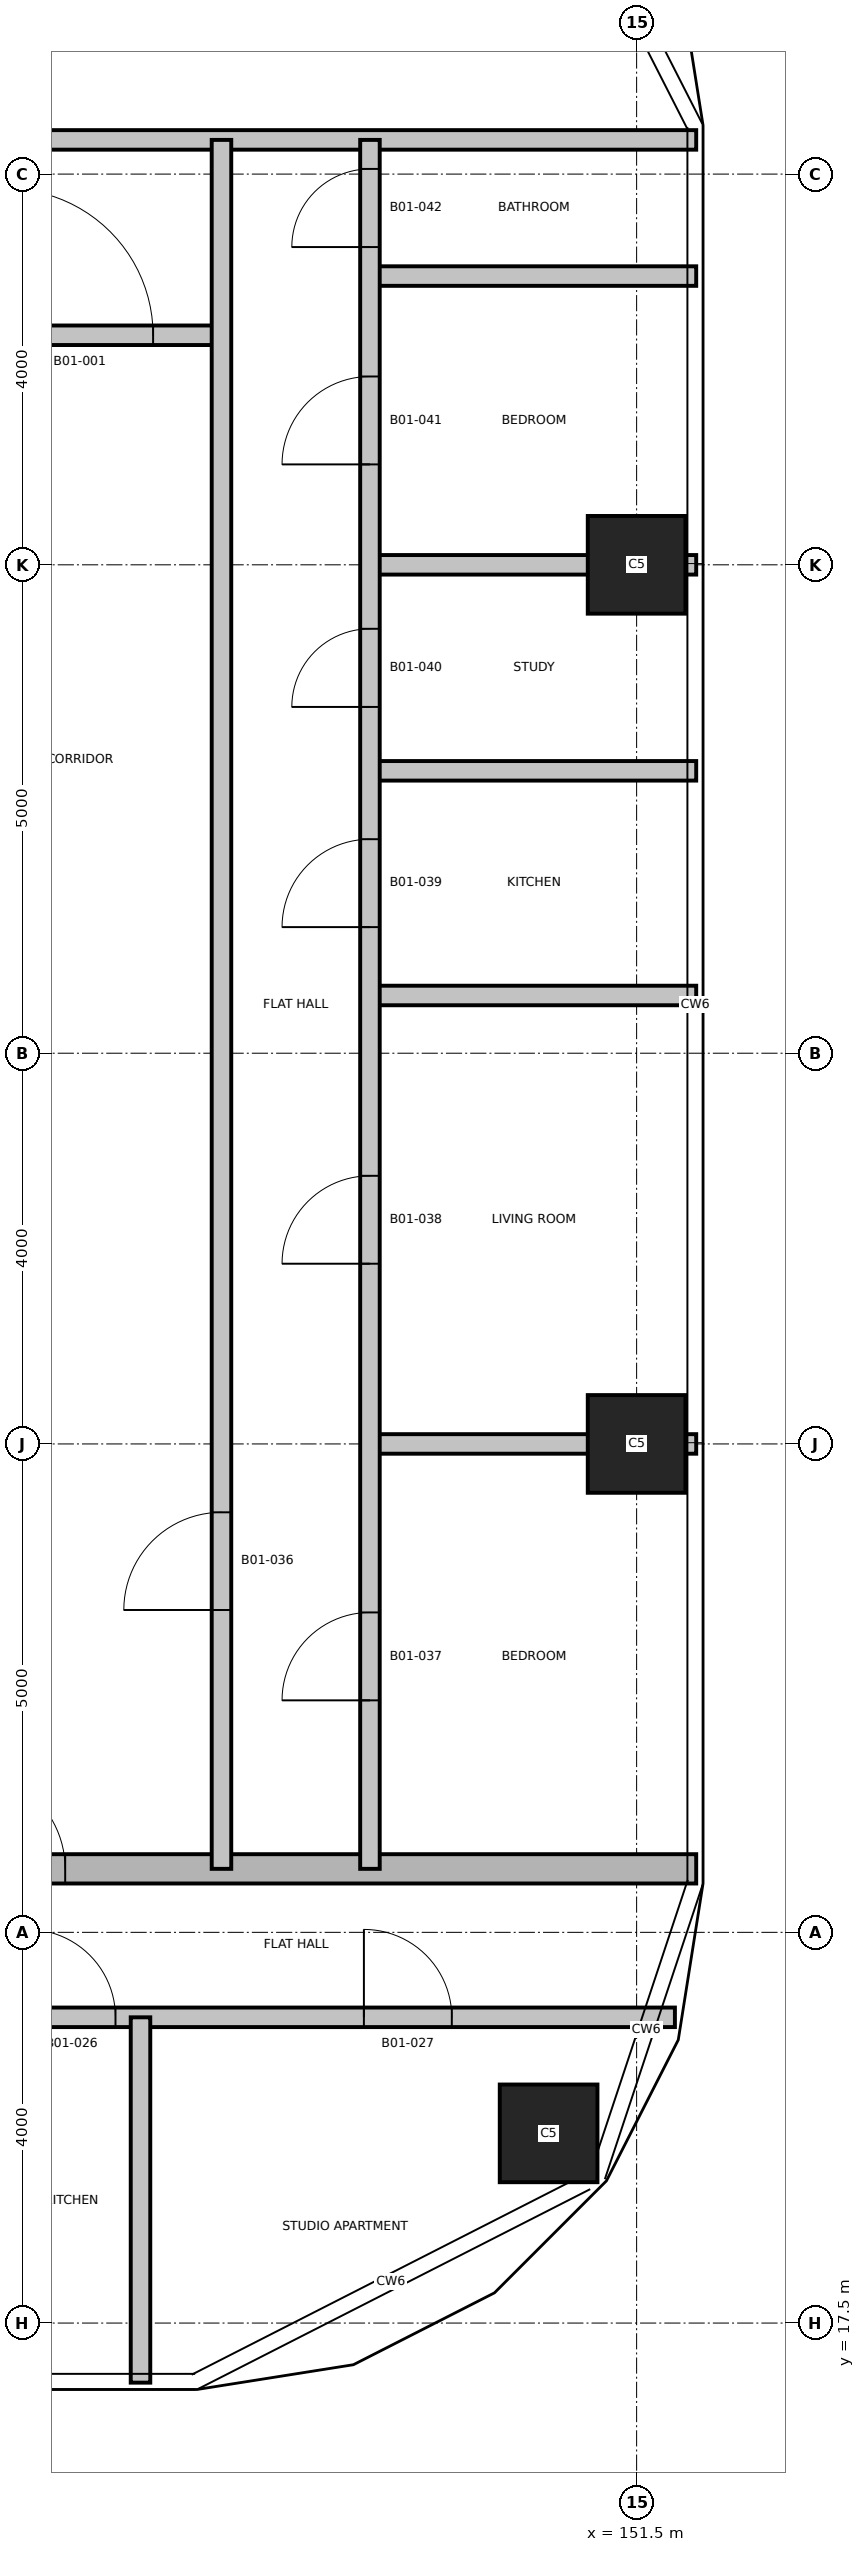
"""IFC4 building model, lengths in metres.
Left out: names, types, materials, properties, quantities, classifications, styles, units other than length and angle.
Written with IfcOpenShell. Run it as: python <this file> out.ifc"""

import sys

from ifc_helpers import new_model, si_unit, direction, frame, frame_2d, origin, origin_2d, place, context, subcontext, project, spatial, rectangle, extrude, element, fill, save


model = new_model("IFC4")
c1 = context("Model", 3, precision=1e-05, world=origin(), true_north=direction((0.0, 1.0)))
c2 = subcontext(c1, "Body", "Model", "MODEL_VIEW")
j1 = project(units=[si_unit("LENGTHUNIT", "METRE"), si_unit("PLANEANGLEUNIT", "RADIAN")], contexts=[c1])
p1 = place(None, origin())
s1 = spatial("IfcSite", under=j1, at=p1, CompositionType="ELEMENT")
p2 = place(p1, origin())
s2 = spatial("IfcBuilding", under=s1, at=p2, CompositionType="ELEMENT")
p3 = place(p2, frame((0.0, 0.0, 37.2)))
s3 = spatial("IfcBuildingStorey", under=s2, at=p3, CompositionType="ELEMENT", Elevation=37.2)
for number, where, z_axis, x_axis in (
    (1, (150.599, 19.442, 0.0), (0.0, 0.0, 1.0), (1.0, 0.0, 0.0)),
    (2, (151.5, 26.5, 0.0), (0.0, 0.0, 1.0), (1.0, 0.0, 0.0)),
    (3, (151.5, 35.5, 0.0), (0.0, 0.0, 1.0), (1.0, 0.0, 0.0)),
):
    element("IfcColumn", number, at=place(p3, frame(where, z_axis=z_axis, x_axis=x_axis)), inside=s3, PredefinedType="COLUMN", context=c2, shape_type="SweptSolid", body=[
        extrude(rectangle(XDim=1.0, YDim=1.0, at=origin_2d()), origin(), (0.0, 0.0, 1.0), 3.7),
    ])
p4 = place(p3, frame((144.0, 20.63, 0.0), z_axis=(0.0, 0.0, 1.0), x_axis=(1.0, 0.0, 0.0)))
e4 = element("IfcWall", 4, at=p4, inside=s3, PredefinedType="PARTITIONING", context=c2, shape_type="SweptSolid", body=[
    extrude(rectangle(XDim=7.892, YDim=0.2, at=frame_2d((3.946, 0.0))), origin(), (0.0, 0.0, 1.0), 3.4),
])
p5 = place(p4, frame((0.17, 0.0, 0.0)))
e5 = element("IfcOpeningElement", 5, at=p5, cuts=e4, PredefinedType="OPENING", context=c2, shape_type="SweptSolid", body=[
    extrude(rectangle(XDim=0.734, YDim=2.1, at=frame_2d((0.367, 1.05))), frame((0.0, 0.11, 0.0), z_axis=(0.0, -1.0, 0.0), x_axis=(1.0, 0.0, 0.0)), (0.0, 0.0, 1.0), 0.22),
])
p6 = place(p4, frame((1.265, 0.0, 0.0)))
e6 = element("IfcOpeningElement", 6, at=p6, cuts=e4, PredefinedType="OPENING", context=c2, shape_type="SweptSolid", body=[
    extrude(rectangle(XDim=0.9, YDim=2.1, at=frame_2d((0.45, 1.05))), frame((0.0, 0.11, 0.0), z_axis=(0.0, -1.0, 0.0), x_axis=(1.0, 0.0, 0.0)), (0.0, 0.0, 1.0), 0.22),
])
p7 = place(p4, frame((4.708, 0.0, 0.0)))
e7 = element("IfcOpeningElement", 7, at=p7, cuts=e4, PredefinedType="OPENING", context=c2, shape_type="SweptSolid", body=[
    extrude(rectangle(XDim=0.9, YDim=2.1, at=frame_2d((0.45, 1.05))), frame((0.0, 0.11, 0.0), z_axis=(0.0, -1.0, 0.0), x_axis=(1.0, 0.0, 0.0)), (0.0, 0.0, 1.0), 0.22),
])
p8 = place(p3, frame((120.89, 22.15, 0.0), z_axis=(0.0, 0.0, 1.0), x_axis=(1.0, 0.0, 0.0)))
e8 = element("IfcWall", 8, at=p8, inside=s3, PredefinedType="SHEAR", context=c2, shape_type="SweptSolid", body=[
    extrude(rectangle(XDim=31.22, YDim=0.3, at=frame_2d((15.61, 0.0))), origin(), (0.0, 0.0, 1.0), 3.4),
])
p9 = place(p8, frame((21.86, 0.0, 0.0)))
e9 = element("IfcOpeningElement", 9, at=p9, cuts=e8, PredefinedType="OPENING", context=c2, shape_type="SweptSolid", body=[
    extrude(rectangle(XDim=1.0, YDim=2.1, at=frame_2d((0.5, 1.05))), frame((0.0, 0.16, 0.0), z_axis=(0.0, -1.0, 0.0), x_axis=(1.0, 0.0, 0.0)), (0.0, 0.0, 1.0), 0.32),
])
p10 = place(p8, frame((6.46, 0.0, 0.0)))
e10 = element("IfcOpeningElement", 10, at=p10, cuts=e8, PredefinedType="OPENING", context=c2, shape_type="SweptSolid", body=[
    extrude(rectangle(XDim=1.0, YDim=2.1, at=frame_2d((0.5, 1.05))), frame((0.0, 0.16, 0.0), z_axis=(0.0, -1.0, 0.0), x_axis=(1.0, 0.0, 0.0)), (0.0, 0.0, 1.0), 0.32),
])
p11 = place(p8, frame((11.36, 0.0, 0.0)))
e11 = element("IfcOpeningElement", 11, at=p11, cuts=e8, PredefinedType="OPENING", context=c2, shape_type="SweptSolid", body=[
    extrude(rectangle(XDim=1.0, YDim=2.1, at=frame_2d((0.5, 1.05))), frame((0.0, 0.16, 0.0), z_axis=(0.0, -1.0, 0.0), x_axis=(1.0, 0.0, 0.0)), (0.0, 0.0, 1.0), 0.32),
])
p12 = place(p8, frame((23.76, 0.0, 0.0)))
e12 = element("IfcOpeningElement", 12, at=p12, cuts=e8, PredefinedType="OPENING", context=c2, shape_type="SweptSolid", body=[
    extrude(rectangle(XDim=1.0, YDim=2.1, at=frame_2d((0.5, 1.05))), frame((0.0, 0.16, 0.0), z_axis=(0.0, -1.0, 0.0), x_axis=(1.0, 0.0, 0.0)), (0.0, 0.0, 1.0), 0.32),
])
p13 = place(p8, frame((15.86, 0.0, 0.0)))
e13 = element("IfcOpeningElement", 13, at=p13, cuts=e8, PredefinedType="OPENING", context=c2, shape_type="SweptSolid", body=[
    extrude(rectangle(XDim=0.9, YDim=2.1, at=frame_2d((0.45, 1.05))), frame((0.0, 0.16, 0.0), z_axis=(0.0, -1.0, 0.0), x_axis=(1.0, 0.0, 0.0)), (0.0, 0.0, 1.0), 0.32),
])
for number, where, z_axis, x_axis in (
    (14, (148.77, 26.5, 0.0), (0.0, 0.0, 1.0), (1.0, 0.0, 0.0)),
    (15, (148.77, 31.091, 0.0), (0.0, 0.0, 1.0), (1.0, 0.0, 0.0)),
    (16, (148.77, 33.391, 0.0), (0.0, 0.0, 1.0), (1.0, 0.0, 0.0)),
    (17, (148.77, 35.5, 0.0), (0.0, 0.0, 1.0), (1.0, 0.0, 0.0)),
):
    element("IfcWall", number, at=place(p3, frame(where, z_axis=z_axis, x_axis=x_axis)), inside=s3, PredefinedType="PARTITIONING", context=c2, shape_type="SweptSolid", body=[
        extrude(rectangle(XDim=3.34, YDim=0.2, at=frame_2d((1.67, 0.0))), origin(), (0.0, 0.0, 1.0), 3.4),
    ])
p14 = place(p3, frame((144.02, 37.85, 0.0), z_axis=(0.0, 0.0, 1.0), x_axis=(1.0, 0.0, 0.0)))
e18 = element("IfcWall", 18, at=p14, inside=s3, PredefinedType="PARTITIONING", context=c2, shape_type="SweptSolid", body=[
    extrude(rectangle(XDim=3.23, YDim=0.2, at=frame_2d((1.615, 0.0))), origin(), (0.0, 0.0, 1.0), 3.4),
])
p15 = place(p14, frame((1.03, 0.0, 0.0)))
e19 = element("IfcOpeningElement", 19, at=p15, cuts=e18, PredefinedType="OPENING", context=c2, shape_type="SweptSolid", body=[
    extrude(rectangle(XDim=1.5, YDim=2.1, at=frame_2d((0.75, 1.05))), frame((0.0, 0.11, 0.0), z_axis=(0.0, -1.0, 0.0), x_axis=(1.0, 0.0, 0.0)), (0.0, 0.0, 1.0), 0.22),
])
p16 = place(p3, frame((148.77, 38.456, 0.0), z_axis=(0.0, 0.0, 1.0), x_axis=(1.0, 0.0, 0.0)))
e20 = element("IfcWall", 20, at=p16, inside=s3, PredefinedType="PARTITIONING", context=c2, shape_type="SweptSolid", body=[
    extrude(rectangle(XDim=3.34, YDim=0.2, at=frame_2d((1.67, 0.0))), origin(), (0.0, 0.0, 1.0), 3.4),
])
p17 = place(p3, frame((120.89, 39.85, 0.0), z_axis=(0.0, 0.0, 1.0), x_axis=(1.0, 0.0, 0.0)))
e21 = element("IfcWall", 21, at=p17, inside=s3, PredefinedType="PARTITIONING", context=c2, shape_type="SweptSolid", body=[
    extrude(rectangle(XDim=31.22, YDim=0.2, at=frame_2d((15.61, 0.0))), origin(), (0.0, 0.0, 1.0), 3.4),
])
p18 = place(p17, frame((10.21, 0.0, 0.0)))
e22 = element("IfcOpeningElement", 22, at=p18, cuts=e21, PredefinedType="OPENING", context=c2, shape_type="SweptSolid", body=[
    extrude(rectangle(XDim=1.0, YDim=2.1, at=frame_2d((0.5, 1.05))), frame((0.0, 0.11, 0.0), z_axis=(0.0, -1.0, 0.0), x_axis=(1.0, 0.0, 0.0)), (0.0, 0.0, 1.0), 0.22),
])
p19 = place(p17, frame((20.01, 0.0, 0.0)))
e23 = element("IfcOpeningElement", 23, at=p19, cuts=e21, PredefinedType="OPENING", context=c2, shape_type="SweptSolid", body=[
    extrude(rectangle(XDim=1.0, YDim=2.1, at=frame_2d((0.5, 1.05))), frame((0.0, 0.11, 0.0), z_axis=(0.0, -1.0, 0.0), x_axis=(1.0, 0.0, 0.0)), (0.0, 0.0, 1.0), 0.22),
])
p20 = place(p3, frame((146.421, 16.89, 0.0), z_axis=(0.0, 0.0, 1.0), x_axis=(0.0, 1.0, 0.0)))
e24 = element("IfcWall", 24, at=p20, inside=s3, PredefinedType="PARTITIONING", context=c2, shape_type="SweptSolid", body=[
    extrude(rectangle(XDim=3.74, YDim=0.2, at=frame_2d((1.87, 0.0))), origin(), (0.0, 0.0, 1.0), 3.4),
])
p21 = place(p3, frame((147.25, 22.15, 0.0), z_axis=(0.0, 0.0, 1.0), x_axis=(0.0, 1.0, 0.0)))
e25 = element("IfcWall", 25, at=p21, inside=s3, PredefinedType="PARTITIONING", context=c2, shape_type="SweptSolid", body=[
    extrude(rectangle(XDim=17.7, YDim=0.2, at=frame_2d((8.85, 0.0))), origin(), (0.0, 0.0, 1.0), 3.4),
])
p22 = place(p21, frame((2.65, 0.0, 0.0)))
e26 = element("IfcOpeningElement", 26, at=p22, cuts=e25, PredefinedType="OPENING", context=c2, shape_type="SweptSolid", body=[
    extrude(rectangle(XDim=1.0, YDim=2.1, at=frame_2d((0.5, 1.05))), frame((0.0, 0.11, 0.0), z_axis=(0.0, -1.0, 0.0), x_axis=(1.0, 0.0, 0.0)), (0.0, 0.0, 1.0), 0.22),
])
p23 = place(p3, frame((148.77, 22.15, 0.0), z_axis=(0.0, 0.0, 1.0), x_axis=(0.0, 1.0, 0.0)))
e27 = element("IfcWall", 27, at=p23, inside=s3, PredefinedType="PARTITIONING", context=c2, shape_type="SweptSolid", body=[
    extrude(rectangle(XDim=17.7, YDim=0.2, at=frame_2d((8.85, 0.0))), origin(), (0.0, 0.0, 1.0), 3.4),
])
p24 = place(p23, frame((1.725, 0.0, 0.0)))
e28 = element("IfcOpeningElement", 28, at=p24, cuts=e27, PredefinedType="OPENING", context=c2, shape_type="SweptSolid", body=[
    extrude(rectangle(XDim=0.9, YDim=2.1, at=frame_2d((0.45, 1.05))), frame((0.0, 0.11, 0.0), z_axis=(0.0, -1.0, 0.0), x_axis=(1.0, 0.0, 0.0)), (0.0, 0.0, 1.0), 0.22),
])
p25 = place(p23, frame((6.195, 0.0, 0.0)))
e29 = element("IfcOpeningElement", 29, at=p25, cuts=e27, PredefinedType="OPENING", context=c2, shape_type="SweptSolid", body=[
    extrude(rectangle(XDim=0.9, YDim=2.1, at=frame_2d((0.45, 1.05))), frame((0.0, 0.11, 0.0), z_axis=(0.0, -1.0, 0.0), x_axis=(1.0, 0.0, 0.0)), (0.0, 0.0, 1.0), 0.22),
])
p26 = place(p23, frame((9.641, 0.0, 0.0)))
e30 = element("IfcOpeningElement", 30, at=p26, cuts=e27, PredefinedType="OPENING", context=c2, shape_type="SweptSolid", body=[
    extrude(rectangle(XDim=0.9, YDim=2.1, at=frame_2d((0.45, 1.05))), frame((0.0, 0.11, 0.0), z_axis=(0.0, -1.0, 0.0), x_axis=(1.0, 0.0, 0.0)), (0.0, 0.0, 1.0), 0.22),
])
p27 = place(p23, frame((11.895, 0.0, 0.0)))
e31 = element("IfcOpeningElement", 31, at=p27, cuts=e27, PredefinedType="OPENING", context=c2, shape_type="SweptSolid", body=[
    extrude(rectangle(XDim=0.8, YDim=2.1, at=frame_2d((0.4, 1.05))), frame((0.0, 0.11, 0.0), z_axis=(0.0, -1.0, 0.0), x_axis=(1.0, 0.0, 0.0)), (0.0, 0.0, 1.0), 0.22),
])
p28 = place(p23, frame((14.378, 0.0, 0.0)))
e32 = element("IfcOpeningElement", 32, at=p28, cuts=e27, PredefinedType="OPENING", context=c2, shape_type="SweptSolid", body=[
    extrude(rectangle(XDim=0.9, YDim=2.1, at=frame_2d((0.45, 1.05))), frame((0.0, 0.11, 0.0), z_axis=(0.0, -1.0, 0.0), x_axis=(1.0, 0.0, 0.0)), (0.0, 0.0, 1.0), 0.22),
])
p29 = place(p23, frame((16.603, 0.0, 0.0)))
e33 = element("IfcOpeningElement", 33, at=p29, cuts=e27, PredefinedType="OPENING", context=c2, shape_type="SweptSolid", body=[
    extrude(rectangle(XDim=0.8, YDim=2.1, at=frame_2d((0.4, 1.05))), frame((0.0, 0.11, 0.0), z_axis=(0.0, -1.0, 0.0), x_axis=(1.0, 0.0, 0.0)), (0.0, 0.0, 1.0), 0.22),
])
p30 = place(p15, origin())
e34 = element("IfcDoor", 34, at=p30, inside=s3, OperationType="SINGLE_SWING_LEFT", PredefinedType="DOOR", context=c2, shape_type="SweptSolid", body=[
    extrude(rectangle(XDim=1.5, YDim=2.1, at=frame_2d((0.75, 1.05))), frame((0.0, 0.025, 0.0), z_axis=(0.0, -1.0, 0.0), x_axis=(1.0, 0.0, 0.0)), (0.0, 0.0, 1.0), 0.05),
])
fill(e19, e34)
p31 = place(p12, origin())
e35 = element("IfcDoor", 35, at=p31, inside=s3, OperationType="SINGLE_SWING_RIGHT", PredefinedType="DOOR", context=c2, shape_type="SweptSolid", body=[
    extrude(rectangle(XDim=1.0, YDim=2.1, at=frame_2d((0.5, 1.05))), frame((0.0, 0.025, 0.0), z_axis=(0.0, -1.0, 0.0), x_axis=(1.0, 0.0, 0.0)), (0.0, 0.0, 1.0), 0.05),
])
fill(e12, e35)
p32 = place(p6, origin())
e36 = element("IfcDoor", 36, at=p32, inside=s3, OperationType="SINGLE_SWING_RIGHT", PredefinedType="DOOR", context=c2, shape_type="SweptSolid", body=[
    extrude(rectangle(XDim=0.9, YDim=2.1, at=frame_2d((0.45, 1.05))), frame((0.0, 0.025, 0.0), z_axis=(0.0, -1.0, 0.0), x_axis=(1.0, 0.0, 0.0)), (0.0, 0.0, 1.0), 0.05),
])
fill(e6, e36)
p33 = place(p7, origin())
e37 = element("IfcDoor", 37, at=p33, inside=s3, OperationType="SINGLE_SWING_LEFT", PredefinedType="DOOR", context=c2, shape_type="SweptSolid", body=[
    extrude(rectangle(XDim=0.9, YDim=2.1, at=frame_2d((0.45, 1.05))), frame((0.0, 0.025, 0.0), z_axis=(0.0, -1.0, 0.0), x_axis=(1.0, 0.0, 0.0)), (0.0, 0.0, 1.0), 0.05),
])
fill(e7, e37)
p34 = place(p22, origin())
e38 = element("IfcDoor", 38, at=p34, inside=s3, OperationType="SINGLE_SWING_RIGHT", PredefinedType="DOOR", context=c2, shape_type="SweptSolid", body=[
    extrude(rectangle(XDim=1.0, YDim=2.1, at=frame_2d((0.5, 1.05))), frame((0.0, 0.025, 0.0), z_axis=(0.0, -1.0, 0.0), x_axis=(1.0, 0.0, 0.0)), (0.0, 0.0, 1.0), 0.05),
])
fill(e26, e38)
p35 = place(p24, origin())
e39 = element("IfcDoor", 39, at=p35, inside=s3, OperationType="SINGLE_SWING_LEFT", PredefinedType="DOOR", context=c2, shape_type="SweptSolid", body=[
    extrude(rectangle(XDim=0.9, YDim=2.1, at=frame_2d((0.45, 1.05))), frame((0.0, 0.025, 0.0), z_axis=(0.0, -1.0, 0.0), x_axis=(1.0, 0.0, 0.0)), (0.0, 0.0, 1.0), 0.05),
])
fill(e28, e39)
p36 = place(p25, origin())
e40 = element("IfcDoor", 40, at=p36, inside=s3, OperationType="SINGLE_SWING_RIGHT", PredefinedType="DOOR", context=c2, shape_type="SweptSolid", body=[
    extrude(rectangle(XDim=0.9, YDim=2.1, at=frame_2d((0.45, 1.05))), frame((0.0, 0.025, 0.0), z_axis=(0.0, -1.0, 0.0), x_axis=(1.0, 0.0, 0.0)), (0.0, 0.0, 1.0), 0.05),
])
fill(e29, e40)
p37 = place(p26, origin())
e41 = element("IfcDoor", 41, at=p37, inside=s3, OperationType="SINGLE_SWING_LEFT", PredefinedType="DOOR", context=c2, shape_type="SweptSolid", body=[
    extrude(rectangle(XDim=0.9, YDim=2.1, at=frame_2d((0.45, 1.05))), frame((0.0, 0.025, 0.0), z_axis=(0.0, -1.0, 0.0), x_axis=(1.0, 0.0, 0.0)), (0.0, 0.0, 1.0), 0.05),
])
fill(e30, e41)
p38 = place(p27, origin())
e42 = element("IfcDoor", 42, at=p38, inside=s3, OperationType="SINGLE_SWING_RIGHT", PredefinedType="DOOR", context=c2, shape_type="SweptSolid", body=[
    extrude(rectangle(XDim=0.8, YDim=2.1, at=frame_2d((0.4, 1.05))), frame((0.0, 0.025, 0.0), z_axis=(0.0, -1.0, 0.0), x_axis=(1.0, 0.0, 0.0)), (0.0, 0.0, 1.0), 0.05),
])
fill(e31, e42)
p39 = place(p28, origin())
e43 = element("IfcDoor", 43, at=p39, inside=s3, OperationType="SINGLE_SWING_LEFT", PredefinedType="DOOR", context=c2, shape_type="SweptSolid", body=[
    extrude(rectangle(XDim=0.9, YDim=2.1, at=frame_2d((0.45, 1.05))), frame((0.0, 0.025, 0.0), z_axis=(0.0, -1.0, 0.0), x_axis=(1.0, 0.0, 0.0)), (0.0, 0.0, 1.0), 0.05),
])
fill(e32, e43)
p40 = place(p29, origin())
e44 = element("IfcDoor", 44, at=p40, inside=s3, OperationType="SINGLE_SWING_RIGHT", PredefinedType="DOOR", context=c2, shape_type="SweptSolid", body=[
    extrude(rectangle(XDim=0.8, YDim=2.1, at=frame_2d((0.4, 1.05))), frame((0.0, 0.025, 0.0), z_axis=(0.0, -1.0, 0.0), x_axis=(1.0, 0.0, 0.0)), (0.0, 0.0, 1.0), 0.05),
])
fill(e33, e44)
save(model, sys.argv[1])
